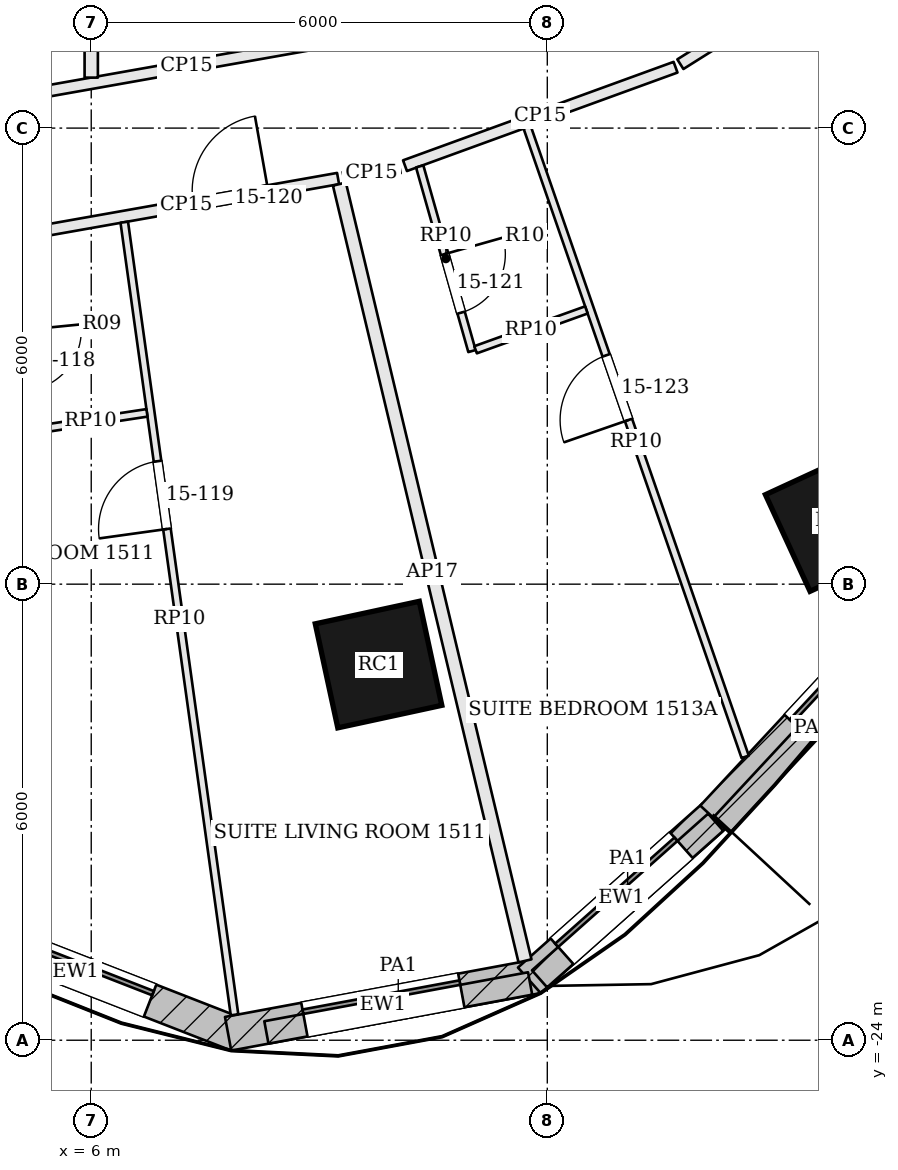
"""IFC4 building model, lengths in metres.
Left out: names, types, materials, properties, quantities, classifications, styles, units other than length and angle.
Written with IfcOpenShell. Run it as: python <this file> out.ifc"""

import sys

from ifc_helpers import new_model, si_unit, direction, frame, frame_2d, origin, origin_2d, place, context, subcontext, project, spatial, rectangle, extrude, element, fill, save


model = new_model("IFC4")
c1 = context("Model", 3, precision=1e-05, world=origin(), true_north=direction((0.0, 1.0)))
c2 = subcontext(c1, "Body", "Model", "MODEL_VIEW")
j1 = project(units=[si_unit("LENGTHUNIT", "METRE"), si_unit("PLANEANGLEUNIT", "RADIAN")], contexts=[c1])
p1 = place(None, origin())
s1 = spatial("IfcSite", under=j1, at=p1, CompositionType="ELEMENT")
p2 = place(p1, origin())
s2 = spatial("IfcBuilding", under=s1, at=p2, CompositionType="ELEMENT")
p3 = place(p2, frame((0.0, 0.0, 69.9)))
s3 = spatial("IfcBuildingStorey", under=s2, at=p3, CompositionType="ELEMENT", Elevation=69.9)
for number, where, z_axis, x_axis in (
    (1, (9.78, -19.058, 0.0), (0.0, 0.0, 1.0), (0.977, 0.211, 0.0)),
    (2, (15.799, -17.165, 0.0), (0.0, 0.0, 1.0), (0.908, 0.419, 0.0)),
):
    element("IfcColumn", number, at=place(p3, frame(where, z_axis=z_axis, x_axis=x_axis)), inside=s3, PredefinedType="COLUMN", context=c2, shape_type="SweptSolid", body=[
        extrude(rectangle(XDim=1.4, YDim=1.4, at=origin_2d()), origin(), (0.0, 0.0, 1.0), 3.6),
    ])
p4 = place(p3, frame((3.672, -22.27, 0.0), z_axis=(0.0, 0.0, 1.0), x_axis=(0.931791503167, -0.36299393194, 0.0)))
e3 = element("IfcWall", 3, at=p4, inside=s3, PredefinedType="SOLIDWALL", context=c2, shape_type="SweptSolid", body=[
    extrude(rectangle(XDim=4.56, YDim=0.45, at=frame_2d((2.28, 0.0))), origin(), (0.0, 0.0, 1.0), 3.4),
])
p5 = place(p4, frame((1.23, 0.0, 0.9)))
e4 = element("IfcOpeningElement", 4, at=p5, cuts=e3, PredefinedType="OPENING", context=c2, shape_type="SweptSolid", body=[
    extrude(rectangle(XDim=2.1, YDim=2.0, at=frame_2d((1.05, 1.0))), frame((0.0, 0.235, 0.0), z_axis=(0.0, -1.0, 0.0), x_axis=(1.0, 0.0, 0.0)), (0.0, 0.0, 1.0), 0.47),
])
p6 = place(p3, frame((7.801, -23.915, 0.0), z_axis=(0.0, 0.0, 1.0), x_axis=(0.983186467795, 0.182604407242, 0.0)))
e5 = element("IfcWall", 5, at=p6, inside=s3, PredefinedType="SOLIDWALL", context=c2, shape_type="SweptSolid", body=[
    extrude(rectangle(XDim=4.141, YDim=0.45, at=frame_2d((2.07, 0.0))), origin(), (0.0, 0.0, 1.0), 3.4),
])
p7 = place(p6, frame((1.02, 0.0, 0.9)))
e6 = element("IfcOpeningElement", 6, at=p7, cuts=e5, PredefinedType="OPENING", context=c2, shape_type="SweptSolid", body=[
    extrude(rectangle(XDim=2.1, YDim=2.0, at=frame_2d((1.05, 1.0))), frame((0.0, 0.235, 0.0), z_axis=(0.0, -1.0, 0.0), x_axis=(1.0, 0.0, 0.0)), (0.0, 0.0, 1.0), 0.47),
])
p8 = place(p3, frame((11.763, -23.212, 0.0), z_axis=(0.0, 0.0, 1.0), x_axis=(0.74723528797, 0.664559571755, 0.0)))
e7 = element("IfcWall", 7, at=p8, inside=s3, PredefinedType="SOLIDWALL", context=c2, shape_type="SweptSolid", body=[
    extrude(rectangle(XDim=3.251, YDim=0.45, at=frame_2d((1.625, 0.0))), origin(), (0.0, 0.0, 1.0), 3.4),
])
p9 = place(p8, frame((0.576, 0.0, 0.9)))
e8 = element("IfcOpeningElement", 8, at=p9, cuts=e7, PredefinedType="OPENING", context=c2, shape_type="SweptSolid", body=[
    extrude(rectangle(XDim=2.1, YDim=2.0, at=frame_2d((1.05, 1.0))), frame((0.0, 0.235, 0.0), z_axis=(0.0, -1.0, 0.0), x_axis=(1.0, 0.0, 0.0)), (0.0, 0.0, 1.0), 0.47),
])
p10 = place(p3, frame((14.177, -21.066, 0.0), z_axis=(0.0, 0.0, 1.0), x_axis=(0.680847709714, 0.732425010617, 0.0)))
e9 = element("IfcWall", 9, at=p10, inside=s3, PredefinedType="SOLIDWALL", context=c2, shape_type="SweptSolid", body=[
    extrude(rectangle(XDim=5.358, YDim=0.45, at=frame_2d((2.679, 0.0))), origin(), (0.0, 0.0, 1.0), 3.4),
])
p11 = place(p10, frame((1.629, 0.0, 0.9)))
e10 = element("IfcOpeningElement", 10, at=p11, cuts=e9, PredefinedType="OPENING", context=c2, shape_type="SweptSolid", body=[
    extrude(rectangle(XDim=2.1, YDim=2.0, at=frame_2d((1.05, 1.0))), frame((0.0, 0.235, 0.0), z_axis=(0.0, -1.0, 0.0), x_axis=(1.0, 0.0, 0.0)), (0.0, 0.0, 1.0), 0.47),
])
p12 = place(p3, frame((8.304, -23.897, 3.6), z_axis=(0.0, 0.0, 1.0), x_axis=(0.983203460001, 0.182512893356, 0.0)))
e11 = element("IfcWall", 11, at=p12, inside=s3, PredefinedType="PARAPET", context=c2, shape_type="SweptSolid", body=[
    extrude(rectangle(XDim=3.529, YDim=0.3, at=frame_2d((1.764, 0.0))), origin(), (0.0, 0.0, 1.0), 1.1),
])
p13 = place(p3, frame((11.898, -23.192, 3.6), z_axis=(0.0, 0.0, 1.0), x_axis=(0.74726596591, 0.664525075669, 0.0)))
e12 = element("IfcWall", 12, at=p13, inside=s3, PredefinedType="PARAPET", context=c2, shape_type="SweptSolid", body=[
    extrude(rectangle(XDim=3.101, YDim=0.3, at=frame_2d((1.551, 0.0))), origin(), (0.0, 0.0, 1.0), 1.1),
])
p14 = place(p3, frame((14.293, -21.174, 3.6), z_axis=(0.0, 0.0, 1.0), x_axis=(0.680821476217, 0.732449395877, 0.0)))
e13 = element("IfcWall", 13, at=p14, inside=s3, PredefinedType="PARAPET", context=c2, shape_type="SweptSolid", body=[
    extrude(rectangle(XDim=3.513, YDim=0.3, at=frame_2d((1.757, 0.0))), origin(), (0.0, 0.0, 1.0), 1.1),
])
p15 = place(p3, frame((5.255, -13.371, 0.0), z_axis=(0.0, 0.0, 1.0), x_axis=(0.984678510279, 0.174379561289, 0.0)))
e14 = element("IfcWall", 14, at=p15, inside=s3, PredefinedType="PARTITIONING", context=c2, shape_type="SweptSolid", body=[
    extrude(rectangle(XDim=4.054, YDim=0.15, at=frame_2d((2.027, 0.0))), origin(), (0.0, 0.0, 1.0), 2.68),
])
p16 = place(p15, frame((2.121, 0.0, 0.0)))
e15 = element("IfcOpeningElement", 15, at=p16, cuts=e14, PredefinedType="OPENING", context=c2, shape_type="SweptSolid", body=[
    extrude(rectangle(XDim=1.0, YDim=2.1, at=frame_2d((0.5, 1.05))), frame((0.0, 0.085, 0.0), z_axis=(0.0, -1.0, 0.0), x_axis=(1.0, 0.0, 0.0)), (0.0, 0.0, 1.0), 0.17),
])
p17 = place(p3, frame((11.707, -22.956, 0.0), z_axis=(0.0, 0.0, 1.0), x_axis=(-0.232380654268, 0.972624918209, 0.0)))
e16 = element("IfcWall", 16, at=p17, inside=s3, PredefinedType="PARTITIONING", context=c2, shape_type="SweptSolid", body=[
    extrude(rectangle(XDim=10.507, YDim=0.175, at=frame_2d((5.253, 0.0))), origin(), (0.0, 0.0, 1.0), 2.68),
])
p18 = place(p3, frame((9.321, -12.651, 0.0), z_axis=(0.0, 0.0, 1.0), x_axis=(0.984674868209, 0.174400125912, 0.0)))
e17 = element("IfcWall", 17, at=p18, inside=s3, PredefinedType="PARTITIONING", context=c2, shape_type="SweptSolid", body=[
    extrude(rectangle(XDim=0.748, YDim=0.15, at=frame_2d((0.374, 0.0))), origin(), (0.0, 0.0, 1.0), 2.68),
])
p19 = place(p3, frame((10.128, -12.494, 0.0), z_axis=(0.0, 0.0, 1.0), x_axis=(0.939720005412, 0.341944895309, 0.0)))
e18 = element("IfcWall", 18, at=p19, inside=s3, PredefinedType="PARTITIONING", context=c2, shape_type="SweptSolid", body=[
    extrude(rectangle(XDim=3.788, YDim=0.15, at=frame_2d((1.894, 0.0))), origin(), (0.0, 0.0, 1.0), 2.68),
])
p20 = place(p3, frame((13.751, -11.159, 0.0), z_axis=(0.0, 0.0, 1.0), x_axis=(0.846413381026, 0.532526420396, 0.0)))
e19 = element("IfcWall", 19, at=p20, inside=s3, PredefinedType="PARTITIONING", context=c2, shape_type="SweptSolid", body=[
    extrude(rectangle(XDim=3.522, YDim=0.15, at=frame_2d((1.761, 0.0))), origin(), (0.0, 0.0, 1.0), 2.68),
])
p21 = place(p20, frame((1.44, 0.0, 0.0)))
e20 = element("IfcOpeningElement", 20, at=p21, cuts=e19, PredefinedType="OPENING", context=c2, shape_type="SweptSolid", body=[
    extrude(rectangle(XDim=1.0, YDim=2.1, at=frame_2d((0.5, 1.05))), frame((0.0, 0.085, 0.0), z_axis=(0.0, -1.0, 0.0), x_axis=(1.0, 0.0, 0.0)), (0.0, 0.0, 1.0), 0.17),
])
p22 = place(p3, frame((9.515, -10.788, 0.0), z_axis=(0.0, 0.0, 1.0), x_axis=(-0.984662912103, -0.174467617423, 0.0)))
e21 = element("IfcWall", 21, at=p22, inside=s3, PredefinedType="PARTITIONING", context=c2, shape_type="SweptSolid", body=[
    extrude(rectangle(XDim=4.593, YDim=0.15, at=frame_2d((2.296, 0.0))), origin(), (0.0, 0.0, 1.0), 2.68),
])
p23 = place(p3, frame((7.885, -23.666, 0.0), z_axis=(0.0, 0.0, 1.0), x_axis=(-0.137793981423, 0.990460912244, 0.0)))
e22 = element("IfcWall", 22, at=p23, inside=s3, PredefinedType="PARTITIONING", context=c2, shape_type="SweptSolid", body=[
    extrude(rectangle(XDim=10.528, YDim=0.1, at=frame_2d((5.264, 0.0))), origin(), (0.0, 0.0, 1.0), 2.898),
])
p24 = place(p23, frame((6.453, 0.0, 0.0)))
e23 = element("IfcOpeningElement", 23, at=p24, cuts=e22, PredefinedType="OPENING", context=c2, shape_type="SweptSolid", body=[
    extrude(rectangle(XDim=0.9, YDim=2.4, at=frame_2d((0.45, 1.2))), frame((0.0, 0.06, 0.0), z_axis=(0.0, -1.0, 0.0), x_axis=(1.0, 0.0, 0.0)), (0.0, 0.0, 1.0), 0.12),
])
p25 = place(p3, frame((5.249, -15.972, 0.0), z_axis=(0.0, 0.0, 1.0), x_axis=(0.988672402225, 0.150089576851, 0.0)))
e24 = element("IfcWall", 24, at=p25, inside=s3, PredefinedType="PARTITIONING", context=c2, shape_type="SweptSolid", body=[
    extrude(rectangle(XDim=1.501, YDim=0.1, at=frame_2d((0.751, 0.0))), origin(), (0.0, 0.0, 1.0), 2.898),
])
p26 = place(p3, frame((14.603, -20.272, 0.0), z_axis=(0.0, 0.0, 1.0), x_axis=(-0.327253103395, 0.944936720801, 0.0)))
e25 = element("IfcWall", 25, at=p26, inside=s3, PredefinedType="PARTITIONING", context=c2, shape_type="SweptSolid", body=[
    extrude(rectangle(XDim=8.765, YDim=0.1, at=frame_2d((4.383, 0.0))), origin(), (0.0, 0.0, 1.0), 2.898),
])
p27 = place(p26, frame((4.69, 0.0, 0.0)))
e26 = element("IfcOpeningElement", 26, at=p27, cuts=e25, PredefinedType="OPENING", context=c2, shape_type="SweptSolid", body=[
    extrude(rectangle(XDim=0.9, YDim=2.4, at=frame_2d((0.45, 1.2))), frame((0.0, 0.06, 0.0), z_axis=(0.0, -1.0, 0.0), x_axis=(1.0, 0.0, 0.0)), (0.0, 0.0, 1.0), 0.12),
])
p28 = place(p3, frame((10.321, -12.504, 0.0), z_axis=(0.0, 0.0, 1.0), x_axis=(0.272498138777, -0.962156309735, 0.0)))
e27 = element("IfcWall", 27, at=p28, inside=s3, PredefinedType="PARTITIONING", context=c2, shape_type="SweptSolid", body=[
    extrude(rectangle(XDim=2.525, YDim=0.1, at=frame_2d((1.262, 0.0))), origin(), (0.0, 0.0, 1.0), 2.898),
])
p29 = place(p28, frame((1.2, 0.0, 0.0)))
e28 = element("IfcOpeningElement", 28, at=p29, cuts=e27, PredefinedType="OPENING", context=c2, shape_type="SweptSolid", body=[
    extrude(rectangle(XDim=0.8, YDim=2.1, at=frame_2d((0.4, 1.05))), frame((0.0, 0.06, 0.0), z_axis=(0.0, -1.0, 0.0), x_axis=(1.0, 0.0, 0.0)), (0.0, 0.0, 1.0), 0.12),
])
p30 = place(p3, frame((11.056, -14.916, 0.0), z_axis=(0.0, 0.0, 1.0), x_axis=(0.941066094494, 0.338222716259, 0.0)))
e29 = element("IfcWall", 29, at=p30, inside=s3, PredefinedType="PARTITIONING", context=c2, shape_type="SweptSolid", body=[
    extrude(rectangle(XDim=1.549, YDim=0.1, at=frame_2d((0.774, 0.0))), origin(), (0.0, 0.0, 1.0), 2.898),
])
p31 = place(p3, frame((6.0, -11.336, 0.0), z_axis=(0.0, 0.0, 1.0), x_axis=(0.0, 1.0, 0.0)))
e30 = element("IfcWall", 30, at=p31, inside=s3, PredefinedType="PARTITIONING", context=c2, shape_type="SweptSolid", body=[
    extrude(rectangle(XDim=6.461, YDim=0.175, at=frame_2d((3.23, 0.0))), origin(), (0.0, 0.0, 1.0), 2.68),
])
p32 = place(p5, origin())
e31 = element("IfcWindow", 31, at=p32, inside=s3, PartitioningType="SINGLE_PANEL", PredefinedType="WINDOW", context=c2, shape_type="SweptSolid", body=[
    extrude(rectangle(XDim=2.1, YDim=2.0, at=frame_2d((1.05, 1.0))), frame((0.0, 0.135, 0.0), z_axis=(0.0, -1.0, 0.0), x_axis=(1.0, 0.0, 0.0)), (0.0, 0.0, 1.0), 0.06),
])
fill(e4, e31)
p33 = place(p7, origin())
e32 = element("IfcWindow", 32, at=p33, inside=s3, PartitioningType="SINGLE_PANEL", PredefinedType="WINDOW", context=c2, shape_type="SweptSolid", body=[
    extrude(rectangle(XDim=2.1, YDim=2.0, at=frame_2d((1.05, 1.0))), frame((0.0, 0.135, 0.0), z_axis=(0.0, -1.0, 0.0), x_axis=(1.0, 0.0, 0.0)), (0.0, 0.0, 1.0), 0.06),
])
fill(e6, e32)
p34 = place(p9, origin())
e33 = element("IfcWindow", 33, at=p34, inside=s3, PartitioningType="SINGLE_PANEL", PredefinedType="WINDOW", context=c2, shape_type="SweptSolid", body=[
    extrude(rectangle(XDim=2.1, YDim=2.0, at=frame_2d((1.05, 1.0))), frame((0.0, 0.135, 0.0), z_axis=(0.0, -1.0, 0.0), x_axis=(1.0, 0.0, 0.0)), (0.0, 0.0, 1.0), 0.06),
])
fill(e8, e33)
p35 = place(p11, origin())
e34 = element("IfcWindow", 34, at=p35, inside=s3, PartitioningType="SINGLE_PANEL", PredefinedType="WINDOW", context=c2, shape_type="SweptSolid", body=[
    extrude(rectangle(XDim=2.1, YDim=2.0, at=frame_2d((1.05, 1.0))), frame((0.0, 0.135, 0.0), z_axis=(0.0, -1.0, 0.0), x_axis=(1.0, 0.0, 0.0)), (0.0, 0.0, 1.0), 0.06),
])
fill(e10, e34)
p36 = place(p24, origin())
e35 = element("IfcDoor", 35, at=p36, inside=s3, OperationType="SINGLE_SWING_LEFT", PredefinedType="DOOR", context=c2, shape_type="SweptSolid", body=[
    extrude(rectangle(XDim=0.9, YDim=2.4, at=frame_2d((0.45, 1.2))), frame((0.0, 0.025, 0.0), z_axis=(0.0, -1.0, 0.0), x_axis=(1.0, 0.0, 0.0)), (0.0, 0.0, 1.0), 0.05),
])
fill(e23, e35)
p37 = place(p16, origin())
e36 = element("IfcDoor", 36, at=p37, inside=s3, OperationType="SINGLE_SWING_RIGHT", PredefinedType="DOOR", context=c2, shape_type="SweptSolid", body=[
    extrude(rectangle(XDim=1.0, YDim=2.1, at=frame_2d((0.5, 1.05))), frame((0.0, 0.025, 0.0), z_axis=(0.0, -1.0, 0.0), x_axis=(1.0, 0.0, 0.0)), (0.0, 0.0, 1.0), 0.05),
])
fill(e15, e36)
p38 = place(p29, origin())
e37 = element("IfcDoor", 37, at=p38, inside=s3, OperationType="SINGLE_SWING_LEFT", PredefinedType="DOOR", context=c2, shape_type="SweptSolid", body=[
    extrude(rectangle(XDim=0.8, YDim=2.1, at=frame_2d((0.4, 1.05))), frame((0.0, 0.025, 0.0), z_axis=(0.0, -1.0, 0.0), x_axis=(1.0, 0.0, 0.0)), (0.0, 0.0, 1.0), 0.05),
])
fill(e28, e37)
p39 = place(p27, origin())
e38 = element("IfcDoor", 38, at=p39, inside=s3, OperationType="SINGLE_SWING_LEFT", PredefinedType="DOOR", context=c2, shape_type="SweptSolid", body=[
    extrude(rectangle(XDim=0.9, YDim=2.4, at=frame_2d((0.45, 1.2))), frame((0.0, 0.025, 0.0), z_axis=(0.0, -1.0, 0.0), x_axis=(1.0, 0.0, 0.0)), (0.0, 0.0, 1.0), 0.05),
])
fill(e26, e38)
save(model, sys.argv[1])
